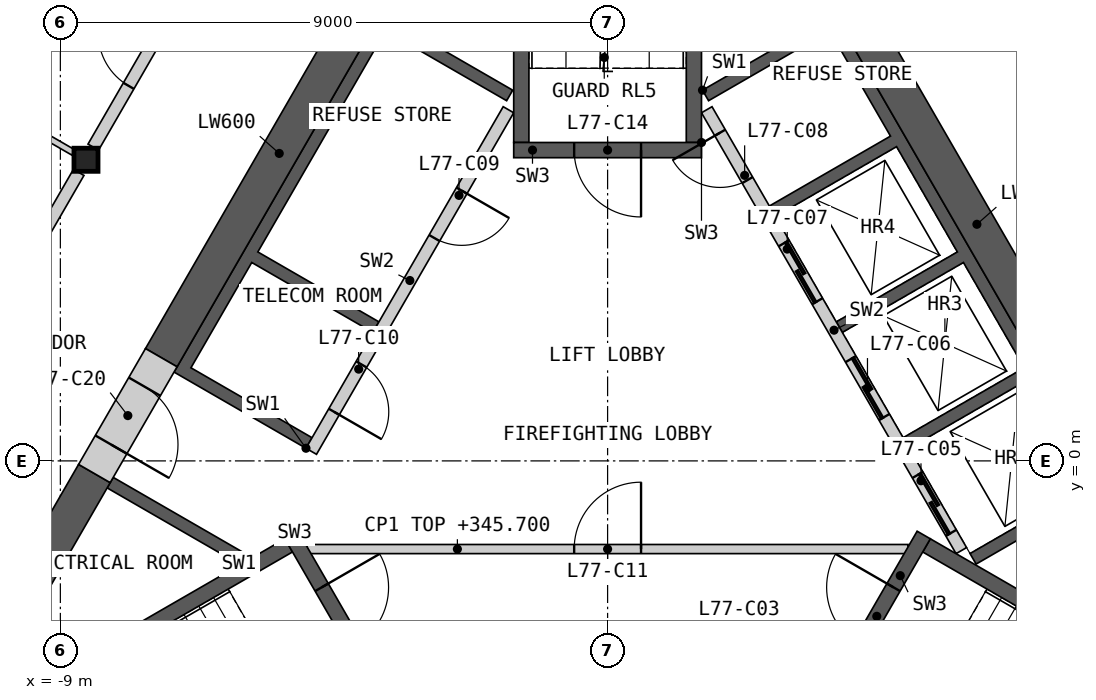
"""IFC4 building model, lengths in metres.
Left out: names, types, materials, properties, quantities, classifications, styles, units other than length and angle.
Written with IfcOpenShell. Run it as: python <this file> out.ifc"""

import sys

from ifc_helpers import new_model, si_unit, direction, frame, frame_2d, origin, origin_2d, place, context, subcontext, project, spatial, polyline, rectangle, i_section, outline, extrude, element, fill, save


model = new_model("IFC4")
c1 = context("Model", 3, precision=1e-05, world=origin(), true_north=direction((0.0, 1.0)))
c2 = subcontext(c1, "Body", "Model", "MODEL_VIEW")
j1 = project(units=[si_unit("LENGTHUNIT", "METRE"), si_unit("PLANEANGLEUNIT", "RADIAN")], contexts=[c1])
p1 = place(None, origin())
s1 = spatial("IfcSite", under=j1, at=p1, CompositionType="ELEMENT")
p2 = place(p1, origin())
s2 = spatial("IfcBuilding", under=s1, at=p2, CompositionType="ELEMENT")
p3 = place(p2, frame((0.0, 0.0, 342.6)))
s3 = spatial("IfcBuildingStorey", under=s2, at=p3, CompositionType="ELEMENT", Elevation=342.6)
p4 = place(p3, frame((-8.578, 4.953, 0.0), z_axis=(0.0, 0.0, 1.0), x_axis=(1.0, 0.0, 0.0)))
e1 = element("IfcColumn", 1, at=p4, inside=s3, PredefinedType="COLUMN", context=c2, shape_type="SweptSolid", body=[
    extrude(i_section(OverallWidth=0.396, OverallDepth=0.381, WebThickness=0.019, FlangeThickness=0.03, at=origin_2d()), origin(), (0.0, 0.0, 1.0), 3.4),
])
p5 = place(p3, origin())
e2 = element("IfcWall", 2, at=p5, inside=s3, PredefinedType="SHEAR", context=c2, shape_type="SweptSolid", body=[
    extrude(outline(polyline([(1.561, 6.097), (3.731, 7.35), (8.231, -0.444), (6.061, -1.697), (5.96, -1.524), (7.952, -0.374), (6.952, 1.358), (4.96, 0.208), (4.861, 0.381), (6.852, 1.531), (5.852, 3.263), (3.861, 2.113), (3.76, 2.287), (5.752, 3.437), (4.752, 5.169), (2.76, 4.019), (2.66, 4.192), (4.652, 5.342), (3.652, 7.074), (1.66, 5.924), (1.561, 6.097)])), origin(), (0.0, 0.0, 1.0), 3.1),
])
p6 = place(p3, frame((5.817, -1.476, 0.0), z_axis=(0.0, 0.0, 1.0), x_axis=(-0.500002616675, 0.866023893041, 0.0)))
e3 = element("IfcWall", 3, at=p6, inside=s3, PredefinedType="SOLIDWALL", context=c2, shape_type="SweptSolid", body=[
    extrude(rectangle(XDim=8.373, YDim=0.2, at=frame_2d((4.187, 0.0))), origin(), (0.0, 0.0, 1.0), 3.1),
])
p7 = place(p6, frame((0.337, 0.0, 0.0)))
e4 = element("IfcOpeningElement", 4, at=p7, cuts=e3, PredefinedType="OPENING", context=c2, shape_type="SweptSolid", body=[
    extrude(rectangle(XDim=1.1, YDim=2.1, at=frame_2d((0.55, 1.05))), frame((0.0, 0.11, 0.0), z_axis=(0.0, -1.0, 0.0), x_axis=(1.0, 0.0, 0.0)), (0.0, 0.0, 1.0), 0.22),
])
p8 = place(p6, frame((2.537, 0.0, 0.0)))
e5 = element("IfcOpeningElement", 5, at=p8, cuts=e3, PredefinedType="OPENING", context=c2, shape_type="SweptSolid", body=[
    extrude(rectangle(XDim=1.1, YDim=2.1, at=frame_2d((0.55, 1.05))), frame((0.0, 0.11, 0.0), z_axis=(0.0, -1.0, 0.0), x_axis=(1.0, 0.0, 0.0)), (0.0, 0.0, 1.0), 0.22),
])
p9 = place(p6, frame((4.737, 0.0, 0.0)))
e6 = element("IfcOpeningElement", 6, at=p9, cuts=e3, PredefinedType="OPENING", context=c2, shape_type="SweptSolid", body=[
    extrude(rectangle(XDim=1.1, YDim=2.1, at=frame_2d((0.55, 1.05))), frame((0.0, 0.11, 0.0), z_axis=(0.0, -1.0, 0.0), x_axis=(1.0, 0.0, 0.0)), (0.0, 0.0, 1.0), 0.22),
])
p10 = place(p6, frame((7.037, 0.0, 0.0)))
e7 = element("IfcOpeningElement", 7, at=p10, cuts=e3, PredefinedType="OPENING", context=c2, shape_type="SweptSolid", body=[
    extrude(rectangle(XDim=0.9, YDim=2.1, at=frame_2d((0.45, 1.05))), frame((0.0, 0.11, 0.0), z_axis=(0.0, -1.0, 0.0), x_axis=(1.0, 0.0, 0.0)), (0.0, 0.0, 1.0), 0.22),
])
p11 = place(p3, origin())
e8 = element("IfcWall", 8, at=p11, inside=s3, PredefinedType="SHEAR", context=c2, shape_type="SweptSolid", body=[
    extrude(outline(polyline([(-6.061, -1.697), (-8.231, -0.444), (-8.131, -0.271), (-5.96, -1.524), (-6.061, -1.697)])), origin(), (0.0, 0.0, 1.0), 3.1),
])
p12 = place(p3, origin())
e9 = element("IfcWall", 9, at=p12, inside=s3, PredefinedType="SHEAR", context=c2, shape_type="SweptSolid", body=[
    extrude(outline(polyline([(-4.96, 0.208), (-7.131, 1.461), (-3.731, 7.35), (-1.561, 6.097), (-1.66, 5.924), (-3.652, 7.074), (-5.752, 3.437), (-3.76, 2.287), (-3.861, 2.113), (-5.852, 3.263), (-6.852, 1.531), (-4.861, 0.381), (-4.96, 0.208)])), origin(), (0.0, 0.0, 1.0), 3.1),
])
p13 = place(p3, frame((-1.631, 5.776, 0.0), z_axis=(0.0, 0.0, 1.0), x_axis=(-0.499992876559, -0.866029516466, 0.0)))
e10 = element("IfcWall", 10, at=p13, inside=s3, PredefinedType="SOLIDWALL", context=c2, shape_type="SweptSolid", body=[
    extrude(rectangle(XDim=6.486, YDim=0.2, at=frame_2d((3.243, 0.0))), origin(), (0.0, 0.0, 1.0), 3.1),
])
p14 = place(p13, frame((1.537, 0.0, 0.0)))
e11 = element("IfcOpeningElement", 11, at=p14, cuts=e10, PredefinedType="OPENING", context=c2, shape_type="SweptSolid", body=[
    extrude(rectangle(XDim=0.9, YDim=2.1, at=frame_2d((0.45, 1.05))), frame((0.0, 0.11, 0.0), z_axis=(0.0, -1.0, 0.0), x_axis=(1.0, 0.0, 0.0)), (0.0, 0.0, 1.0), 0.22),
])
p15 = place(p13, frame((4.837, 0.0, 0.0)))
e12 = element("IfcOpeningElement", 12, at=p15, cuts=e10, PredefinedType="OPENING", context=c2, shape_type="SweptSolid", body=[
    extrude(rectangle(XDim=0.9, YDim=2.1, at=frame_2d((0.45, 1.05))), frame((0.0, 0.11, 0.0), z_axis=(0.0, -1.0, 0.0), x_axis=(1.0, 0.0, 0.0)), (0.0, 0.0, 1.0), 0.22),
])
p16 = place(p3, frame((-4.941, -1.45, 0.0), z_axis=(0.0, 0.0, 1.0), x_axis=(1.0, 0.0, 0.0)))
e13 = element("IfcWall", 13, at=p16, inside=s3, PredefinedType="PARTITIONING", context=c2, shape_type="SweptSolid", body=[
    extrude(rectangle(XDim=9.882, YDim=0.15, at=frame_2d((4.941, 0.0))), origin(), (0.0, 0.0, 1.0), 3.1),
])
p17 = place(p16, frame((4.391, 0.0, 0.0)))
e14 = element("IfcOpeningElement", 14, at=p17, cuts=e13, PredefinedType="OPENING", context=c2, shape_type="SweptSolid", body=[
    extrude(rectangle(XDim=1.1, YDim=2.1, at=frame_2d((0.55, 1.05))), frame((0.0, 0.085, 0.0), z_axis=(0.0, -1.0, 0.0), x_axis=(1.0, 0.0, 0.0)), (0.0, 0.0, 1.0), 0.17),
])
p18 = place(p3, origin())
e15 = element("IfcWall", 15, at=p18, inside=s3, PredefinedType="SHEAR", context=c2, shape_type="SweptSolid", body=[
    extrude(outline(polyline([(-5.307, -1.281), (-10.374, -4.206), (-10.032, -4.298), (-5.182, -1.498), (-5.307, -1.281)])), origin(), (0.0, 0.0, 1.0), 3.1),
])
p19 = place(p3, frame((-5.199, -1.219, 0.0), z_axis=(0.0, 0.0, 1.0), x_axis=(0.499982516597, -0.866035497597, 0.0)))
e16 = element("IfcWall", 16, at=p19, inside=s3, PredefinedType="SHEAR", context=c2, shape_type="SweptSolid", body=[
    extrude(rectangle(XDim=3.088, YDim=0.25, at=frame_2d((1.544, 0.0))), origin(), (0.0, 0.0, 1.0), 3.1),
])
p20 = place(p19, frame((0.994, 0.0, 0.0)))
e17 = element("IfcOpeningElement", 17, at=p20, cuts=e16, PredefinedType="OPENING", context=c2, shape_type="SweptSolid", body=[
    extrude(rectangle(XDim=1.1, YDim=2.1, at=frame_2d((0.55, 1.05))), frame((0.0, 0.135, 0.0), z_axis=(0.0, -1.0, 0.0), x_axis=(1.0, 0.0, 0.0)), (0.0, 0.0, 1.0), 0.27),
])
p21 = place(p3, origin())
e18 = element("IfcWall", 18, at=p21, inside=s3, PredefinedType="SHEAR", context=c2, shape_type="SweptSolid", body=[
    extrude(outline(polyline([(10.032, -4.298), (10.374, -4.206), (5.307, -1.281), (5.182, -1.498), (10.032, -4.298)])), origin(), (0.0, 0.0, 1.0), 3.1),
])
p22 = place(p3, frame((3.655, -3.893, 0.0), z_axis=(0.0, 0.0, 1.0), x_axis=(0.499982516597, 0.866035497597, 0.0)))
e19 = element("IfcWall", 19, at=p22, inside=s3, PredefinedType="SHEAR", context=c2, shape_type="SweptSolid", body=[
    extrude(rectangle(XDim=3.088, YDim=0.25, at=frame_2d((1.544, 0.0))), origin(), (0.0, 0.0, 1.0), 3.1),
])
p23 = place(p22, frame((0.994, 0.0, 0.0)))
e20 = element("IfcOpeningElement", 20, at=p23, cuts=e19, PredefinedType="OPENING", context=c2, shape_type="SweptSolid", body=[
    extrude(rectangle(XDim=1.1, YDim=2.1, at=frame_2d((0.55, 1.05))), frame((0.0, 0.135, 0.0), z_axis=(0.0, -1.0, 0.0), x_axis=(1.0, 0.0, 0.0)), (0.0, 0.0, 1.0), 0.27),
])
p24 = place(p3, origin())
e21 = element("IfcWall", 21, at=p24, inside=s3, PredefinedType="SHEAR", context=c2, shape_type="SweptSolid", body=[
    extrude(outline(polyline([(1.544, 5.237), (1.544, 11.087), (1.294, 10.837), (1.294, 5.237), (1.544, 5.237)])), origin(), (0.0, 0.0, 1.0), 3.1),
])
p25 = place(p3, origin())
e22 = element("IfcWall", 22, at=p25, inside=s3, PredefinedType="SHEAR", context=c2, shape_type="SweptSolid", body=[
    extrude(outline(polyline([(-1.294, 10.837), (-1.544, 11.087), (-1.544, 5.237), (-1.294, 5.237), (-1.294, 10.837)])), origin(), (0.0, 0.0, 1.0), 3.1),
])
p26 = place(p3, frame((1.544, 5.112, 0.0), z_axis=(0.0, 0.0, 1.0), x_axis=(-1.0, 0.0, 0.0)))
e23 = element("IfcWall", 23, at=p26, inside=s3, PredefinedType="SHEAR", context=c2, shape_type="SweptSolid", body=[
    extrude(rectangle(XDim=3.088, YDim=0.25, at=frame_2d((1.544, 0.0))), origin(), (0.0, 0.0, 1.0), 3.1),
])
p27 = place(p26, frame((0.994, 0.0, 0.0)))
e24 = element("IfcOpeningElement", 24, at=p27, cuts=e23, PredefinedType="OPENING", context=c2, shape_type="SweptSolid", body=[
    extrude(rectangle(XDim=1.1, YDim=2.1, at=frame_2d((0.55, 1.05))), frame((0.0, 0.135, 0.0), z_axis=(0.0, -1.0, 0.0), x_axis=(1.0, 0.0, 0.0)), (0.0, 0.0, 1.0), 0.27),
])
p28 = place(p3, frame((8.686, -0.634, 0.0), z_axis=(0.0, 0.0, 1.0), x_axis=(-0.50001836461, 0.866014800712, 0.0)))
e25 = element("IfcWall", 25, at=p28, inside=s3, PredefinedType="SHEAR", context=c2, shape_type="SweptSolid", body=[
    extrude(rectangle(XDim=10.451, YDim=0.6, at=frame_2d((5.225, 0.0))), origin(), (0.0, 0.0, 1.0), 3.1),
])
p29 = place(p3, frame((-3.461, 8.417, 0.0), z_axis=(0.0, 0.0, 1.0), x_axis=(-0.50000391502, -0.866023143435, 0.0)))
e26 = element("IfcWall", 26, at=p29, inside=s3, PredefinedType="SHEAR", context=c2, shape_type="SweptSolid", body=[
    extrude(rectangle(XDim=7.759, YDim=0.6, at=frame_2d((3.879, 0.0))), origin(), (0.0, 0.0, 1.0), 3.1),
])
p30 = place(p3, frame((-8.44, -0.208, 0.0), z_axis=(0.0, 0.0, 1.0), x_axis=(-0.500007425856, -0.866021116422, 0.0)))
e27 = element("IfcWall", 27, at=p30, inside=s3, PredefinedType="SHEAR", context=c2, shape_type="SweptSolid", body=[
    extrude(rectangle(XDim=4.969, YDim=0.6, at=frame_2d((2.484, 0.0))), origin(), (0.0, 0.0, 1.0), 3.1),
])
p31 = place(p3, frame((-7.34, 1.698, 0.0), z_axis=(0.0, 0.0, 1.0), x_axis=(-0.50002983664, -0.866008176907, 0.0)))
e28 = element("IfcWall", 28, at=p31, inside=s3, PredefinedType="SHEAR", context=c2, shape_type="SweptSolid", body=[
    extrude(rectangle(XDim=2.2, YDim=0.6, at=frame_2d((1.1, 0.0))), origin(), (0.0, 0.0, 1.0), 3.1),
])
p32 = place(p31, frame((0.55, 0.0, 0.0)))
e29 = element("IfcOpeningElement", 29, at=p32, cuts=e28, PredefinedType="OPENING", context=c2, shape_type="SweptSolid", body=[
    extrude(rectangle(XDim=1.1, YDim=2.1, at=frame_2d((0.55, 1.05))), frame((0.0, 0.31, 0.0), z_axis=(0.0, -1.0, 0.0), x_axis=(1.0, 0.0, 0.0)), (0.0, 0.0, 1.0), 0.62),
])
p33 = place(p3, frame((4.409, 12.174, 0.0), z_axis=(0.0, 0.0, 1.0), x_axis=(0.499984266882, -0.866034487114, 0.0)))
e30 = element("IfcWall", 30, at=p33, inside=s3, PredefinedType="PARTITIONING", context=c2, shape_type="SweptSolid", body=[
    extrude(rectangle(XDim=8.099, YDim=0.2, at=frame_2d((4.049, 0.0))), origin(), (0.0, 0.0, 1.0), 3.1),
])
p34 = place(p33, frame((5.123, 0.0, 0.0)))
e31 = element("IfcOpeningElement", 31, at=p34, cuts=e30, PredefinedType="OPENING", context=c2, shape_type="SweptSolid", body=[
    extrude(rectangle(XDim=1.0, YDim=2.1, at=frame_2d((0.5, 1.05))), frame((0.0, 0.11, 0.0), z_axis=(0.0, -1.0, 0.0), x_axis=(1.0, 0.0, 0.0)), (0.0, 0.0, 1.0), 0.22),
])
p35 = place(p33, frame((1.164, 0.0, 0.0)))
e32 = element("IfcOpeningElement", 32, at=p35, cuts=e30, PredefinedType="OPENING", context=c2, shape_type="SweptSolid", body=[
    extrude(rectangle(XDim=1.0, YDim=2.1, at=frame_2d((0.5, 1.05))), frame((0.0, 0.11, 0.0), z_axis=(0.0, -1.0, 0.0), x_axis=(1.0, 0.0, 0.0)), (0.0, 0.0, 1.0), 0.22),
])
p36 = place(p3, frame((-8.458, 5.16, 0.0), z_axis=(0.0, 0.0, 1.0), x_axis=(0.499984266882, 0.866034487114, 0.0)))
e33 = element("IfcWall", 33, at=p36, inside=s3, PredefinedType="PARTITIONING", context=c2, shape_type="SweptSolid", body=[
    extrude(rectangle(XDim=8.099, YDim=0.2, at=frame_2d((4.049, 0.0))), origin(), (0.0, 0.0, 1.0), 3.1),
])
p37 = place(p36, frame((1.164, 0.0, 0.0)))
e34 = element("IfcOpeningElement", 34, at=p37, cuts=e33, PredefinedType="OPENING", context=c2, shape_type="SweptSolid", body=[
    extrude(rectangle(XDim=1.0, YDim=2.1, at=frame_2d((0.5, 1.05))), frame((0.0, 0.11, 0.0), z_axis=(0.0, -1.0, 0.0), x_axis=(1.0, 0.0, 0.0)), (0.0, 0.0, 1.0), 0.22),
])
p38 = place(p3, frame((-12.748, -2.269, 0.0), z_axis=(0.0, 0.0, 1.0), x_axis=(0.499984266882, 0.866034487114, 0.0)))
e35 = element("IfcWall", 35, at=p38, inside=s3, PredefinedType="PARTITIONING", context=c2, shape_type="SweptSolid", body=[
    extrude(rectangle(XDim=8.099, YDim=0.2, at=frame_2d((4.049, 0.0))), origin(), (0.0, 0.0, 1.0), 3.1),
])
p39 = place(p3, frame((-19.615, 11.325, 0.0), z_axis=(0.0, 0.0, 1.0), x_axis=(0.86602139559, -0.500006942333, 0.0)))
e36 = element("IfcWall", 36, at=p39, inside=s3, PredefinedType="PARTITIONING", context=c2, shape_type="SweptSolid", body=[
    extrude(rectangle(XDim=12.505, YDim=0.1, at=frame_2d((6.252, 0.0))), origin(), (0.0, 0.0, 1.0), 2.33),
])
p40 = place(p39, frame((6.38, 0.0, 0.0)))
e37 = element("IfcOpeningElement", 37, at=p40, cuts=e36, PredefinedType="OPENING", context=c2, shape_type="SweptSolid", body=[
    extrude(rectangle(XDim=0.95, YDim=2.1, at=frame_2d((0.475, 1.05))), frame((0.0, 0.06, 0.0), z_axis=(0.0, -1.0, 0.0), x_axis=(1.0, 0.0, 0.0)), (0.0, 0.0, 1.0), 0.12),
])
p41 = place(p7, origin())
e38 = element("IfcDoor", 38, at=p41, inside=s3, OperationType="SLIDING_TO_LEFT", PredefinedType="DOOR", context=c2, shape_type="SweptSolid", body=[
    extrude(rectangle(XDim=1.1, YDim=2.1, at=frame_2d((0.55, 1.05))), frame((0.0, 0.025, 0.0), z_axis=(0.0, -1.0, 0.0), x_axis=(1.0, 0.0, 0.0)), (0.0, 0.0, 1.0), 0.05),
])
fill(e4, e38)
p42 = place(p8, origin())
e39 = element("IfcDoor", 39, at=p42, inside=s3, OperationType="SLIDING_TO_LEFT", PredefinedType="DOOR", context=c2, shape_type="SweptSolid", body=[
    extrude(rectangle(XDim=1.1, YDim=2.1, at=frame_2d((0.55, 1.05))), frame((0.0, 0.025, 0.0), z_axis=(0.0, -1.0, 0.0), x_axis=(1.0, 0.0, 0.0)), (0.0, 0.0, 1.0), 0.05),
])
fill(e5, e39)
p43 = place(p9, origin())
e40 = element("IfcDoor", 40, at=p43, inside=s3, OperationType="SLIDING_TO_LEFT", PredefinedType="DOOR", context=c2, shape_type="SweptSolid", body=[
    extrude(rectangle(XDim=1.1, YDim=2.1, at=frame_2d((0.55, 1.05))), frame((0.0, 0.025, 0.0), z_axis=(0.0, -1.0, 0.0), x_axis=(1.0, 0.0, 0.0)), (0.0, 0.0, 1.0), 0.05),
])
fill(e6, e40)
p44 = place(p10, origin())
e41 = element("IfcDoor", 41, at=p44, inside=s3, OperationType="SINGLE_SWING_RIGHT", PredefinedType="DOOR", context=c2, shape_type="SweptSolid", body=[
    extrude(rectangle(XDim=0.9, YDim=2.1, at=frame_2d((0.45, 1.05))), frame((0.0, 0.025, 0.0), z_axis=(0.0, -1.0, 0.0), x_axis=(1.0, 0.0, 0.0)), (0.0, 0.0, 1.0), 0.05),
])
fill(e7, e41)
p45 = place(p14, origin())
e42 = element("IfcDoor", 42, at=p45, inside=s3, OperationType="SINGLE_SWING_LEFT", PredefinedType="DOOR", context=c2, shape_type="SweptSolid", body=[
    extrude(rectangle(XDim=0.9, YDim=2.1, at=frame_2d((0.45, 1.05))), frame((0.0, 0.025, 0.0), z_axis=(0.0, -1.0, 0.0), x_axis=(1.0, 0.0, 0.0)), (0.0, 0.0, 1.0), 0.05),
])
fill(e11, e42)
p46 = place(p15, origin())
e43 = element("IfcDoor", 43, at=p46, inside=s3, OperationType="SINGLE_SWING_RIGHT", PredefinedType="DOOR", context=c2, shape_type="SweptSolid", body=[
    extrude(rectangle(XDim=0.9, YDim=2.1, at=frame_2d((0.45, 1.05))), frame((0.0, 0.025, 0.0), z_axis=(0.0, -1.0, 0.0), x_axis=(1.0, 0.0, 0.0)), (0.0, 0.0, 1.0), 0.05),
])
fill(e12, e43)
p47 = place(p17, origin())
e44 = element("IfcDoor", 44, at=p47, inside=s3, OperationType="SINGLE_SWING_RIGHT", PredefinedType="DOOR", context=c2, shape_type="SweptSolid", body=[
    extrude(rectangle(XDim=1.1, YDim=2.1, at=frame_2d((0.55, 1.05))), frame((0.0, 0.025, 0.0), z_axis=(0.0, -1.0, 0.0), x_axis=(1.0, 0.0, 0.0)), (0.0, 0.0, 1.0), 0.05),
])
fill(e14, e44)
p48 = place(p20, origin())
e45 = element("IfcDoor", 45, at=p48, inside=s3, OperationType="SINGLE_SWING_LEFT", PredefinedType="DOOR", context=c2, shape_type="SweptSolid", body=[
    extrude(rectangle(XDim=1.1, YDim=2.1, at=frame_2d((0.55, 1.05))), frame((0.0, 0.025, 0.0), z_axis=(0.0, -1.0, 0.0), x_axis=(1.0, 0.0, 0.0)), (0.0, 0.0, 1.0), 0.05),
])
fill(e17, e45)
p49 = place(p23, origin())
e46 = element("IfcDoor", 46, at=p49, inside=s3, OperationType="SINGLE_SWING_RIGHT", PredefinedType="DOOR", context=c2, shape_type="SweptSolid", body=[
    extrude(rectangle(XDim=1.1, YDim=2.1, at=frame_2d((0.55, 1.05))), frame((0.0, 0.025, 0.0), z_axis=(0.0, -1.0, 0.0), x_axis=(1.0, 0.0, 0.0)), (0.0, 0.0, 1.0), 0.05),
])
fill(e20, e46)
p50 = place(p27, origin())
e47 = element("IfcDoor", 47, at=p50, inside=s3, OperationType="SINGLE_SWING_LEFT", PredefinedType="DOOR", context=c2, shape_type="SweptSolid", body=[
    extrude(rectangle(XDim=1.1, YDim=2.1, at=frame_2d((0.55, 1.05))), frame((0.0, 0.025, 0.0), z_axis=(0.0, -1.0, 0.0), x_axis=(1.0, 0.0, 0.0)), (0.0, 0.0, 1.0), 0.05),
])
fill(e24, e47)
p51 = place(p32, origin())
e48 = element("IfcDoor", 48, at=p51, inside=s3, OperationType="SINGLE_SWING_RIGHT", PredefinedType="DOOR", context=c2, shape_type="SweptSolid", body=[
    extrude(rectangle(XDim=1.1, YDim=2.1, at=frame_2d((0.55, 1.05))), frame((0.0, 0.055, 0.0), z_axis=(0.0, -1.0, 0.0), x_axis=(1.0, 0.0, 0.0)), (0.0, 0.0, 1.0), 0.05),
])
fill(e29, e48)
p52 = place(p37, origin())
e49 = element("IfcDoor", 49, at=p52, inside=s3, OperationType="SINGLE_SWING_RIGHT", PredefinedType="DOOR", context=c2, shape_type="SweptSolid", body=[
    extrude(rectangle(XDim=1.0, YDim=2.1, at=frame_2d((0.5, 1.05))), frame((0.0, 0.025, 0.0), z_axis=(0.0, -1.0, 0.0), x_axis=(1.0, 0.0, 0.0)), (0.0, 0.0, 1.0), 0.05),
])
fill(e34, e49)
save(model, sys.argv[1])
